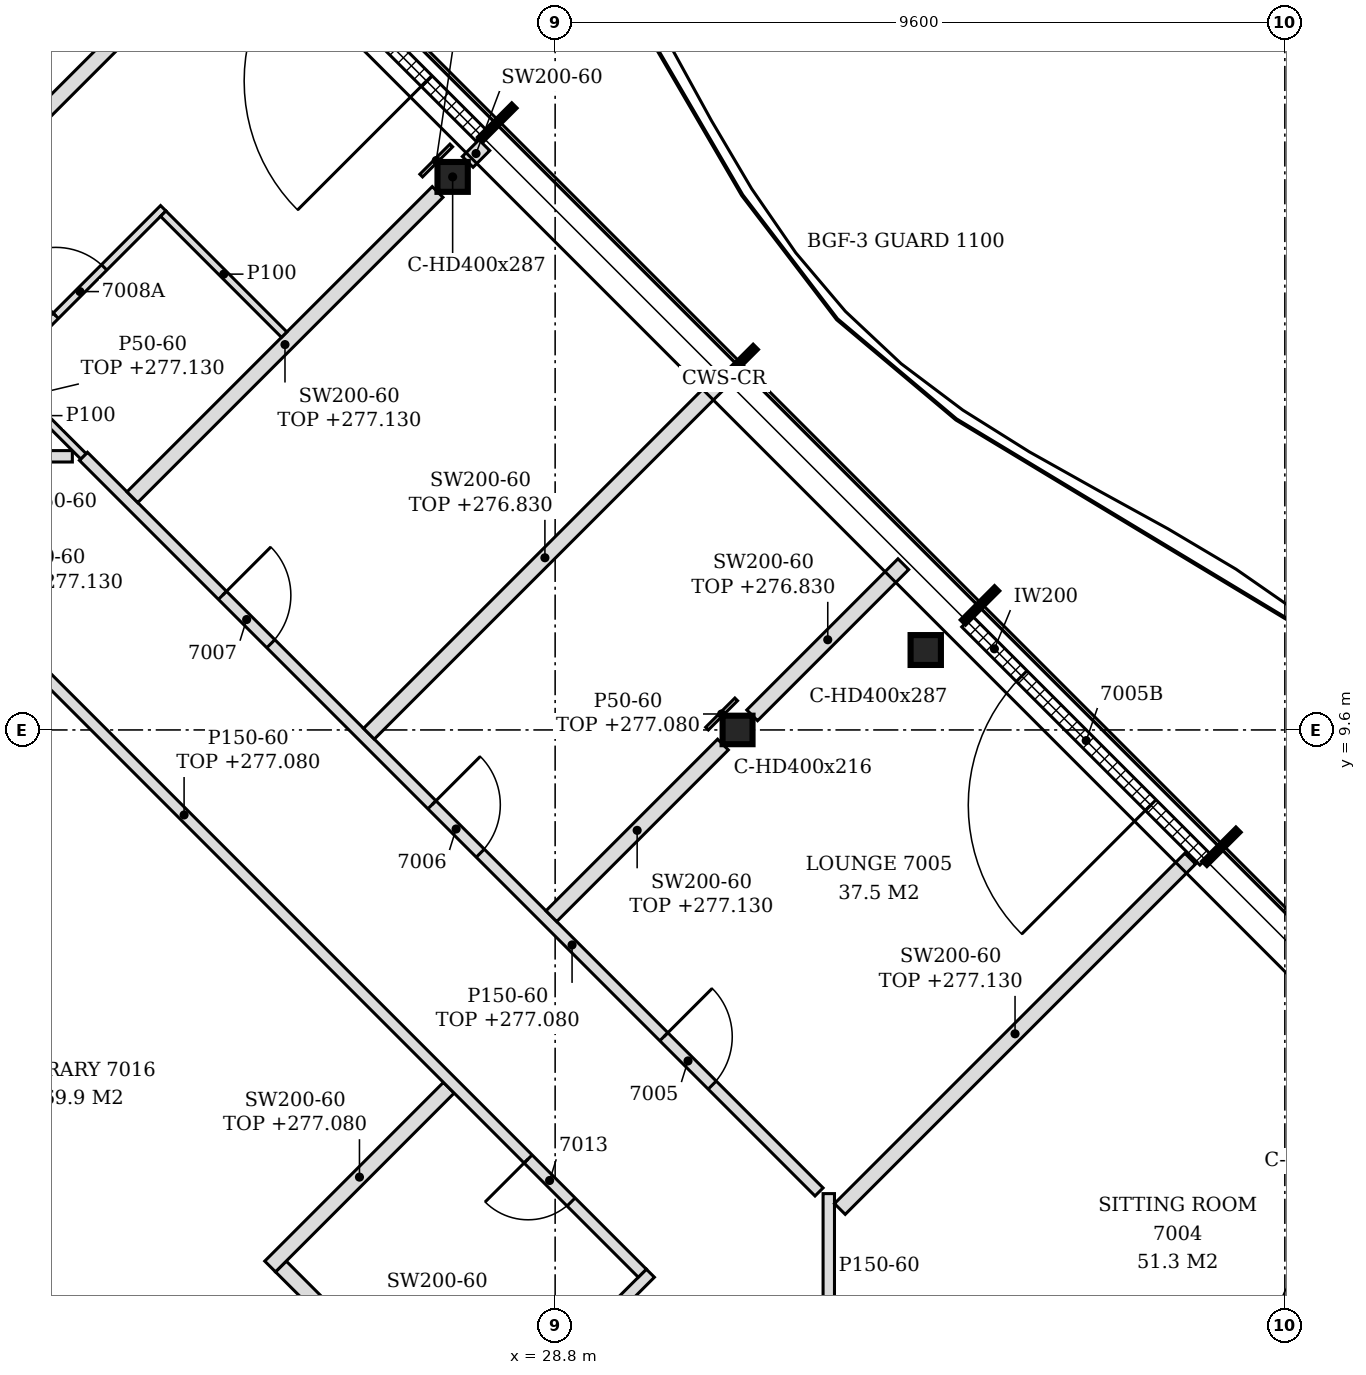
"""IFC4 building model, lengths in metres.
Left out: names, types, materials, properties, quantities, classifications, styles, units other than length and angle.
Written with IfcOpenShell. Run it as: python <this file> out.ifc"""

import sys

from ifc_helpers import new_model, si_unit, direction, frame, frame_2d, origin, origin_2d, place, context, subcontext, project, spatial, rectangle, i_section, extrude, element, fill, save


model = new_model("IFC4")
c1 = context("Model", 3, precision=1e-05, world=origin(), true_north=direction((0.0, 1.0)))
c2 = subcontext(c1, "Body", "Model", "MODEL_VIEW")
j1 = project(units=[si_unit("LENGTHUNIT", "METRE"), si_unit("PLANEANGLEUNIT", "RADIAN")], contexts=[c1])
p1 = place(None, origin())
s1 = spatial("IfcSite", under=j1, at=p1, CompositionType="ELEMENT")
p2 = place(p1, origin())
s2 = spatial("IfcBuilding", under=s1, at=p2, CompositionType="ELEMENT")
p3 = place(p2, frame((0.0, 0.0, 274.2)))
s3 = spatial("IfcBuildingStorey", under=s2, at=p3, CompositionType="ELEMENT", Elevation=274.2)
for number, where, z_axis, x_axis in (
    (1, (33.676, 10.652, -0.15), (0.0, 0.0, 1.0), (1.0, 0.0, 0.0)),
    (2, (27.451, 16.876, -0.15), (0.0, 0.0, 1.0), (1.0, 0.0, 0.0)),
):
    element("IfcColumn", number, at=place(p3, frame(where, z_axis=z_axis, x_axis=x_axis)), inside=s3, PredefinedType="COLUMN", context=c2, shape_type="SweptSolid", body=[
        extrude(i_section(OverallWidth=0.399, OverallDepth=0.393, WebThickness=0.023, FlangeThickness=0.037, FilletRadius=0.015, at=origin_2d()), origin(), (0.0, 0.0, 1.0), 3.6),
    ])
p4 = place(p3, frame((31.2, 9.6, -0.15), z_axis=(0.0, 0.0, 1.0), x_axis=(1.0, 0.0, 0.0)))
e3 = element("IfcColumn", 3, at=p4, inside=s3, PredefinedType="COLUMN", context=c2, shape_type="SweptSolid", body=[
    extrude(i_section(OverallWidth=0.394, OverallDepth=0.375, WebThickness=0.017, FlangeThickness=0.028, FilletRadius=0.015, at=origin_2d()), origin(), (0.0, 0.0, 1.0), 3.6),
])
p5 = place(p3, frame((37.353, 7.893, 0.0), z_axis=(0.0, 0.0, 1.0), x_axis=(-0.707134329907, 0.707079231393, 0.0)))
e4 = element("IfcWall", 4, at=p5, inside=s3, PredefinedType="NOTDEFINED", context=c2, shape_type="SweptSolid", body=[
    extrude(rectangle(XDim=4.431, YDim=0.2, at=frame_2d((2.215, 0.0))), origin(), (0.0, 0.0, 1.0), 3.45),
])
p6 = place(p5, frame((1.015, 0.0, 0.0)))
e5 = element("IfcOpeningElement", 5, at=p6, cuts=e4, PredefinedType="OPENING", context=c2, shape_type="SweptSolid", body=[
    extrude(rectangle(XDim=2.4, YDim=2.4, at=frame_2d((1.2, 1.2))), frame((0.0, 0.11, 0.0), z_axis=(0.0, -1.0, 0.0), x_axis=(1.0, 0.0, 0.0)), (0.0, 0.0, 1.0), 0.22),
])
p7 = place(p3, frame((27.826, 17.42, 0.0), z_axis=(0.0, 0.0, 1.0), x_axis=(-0.707079231393, 0.707134329907, 0.0)))
e6 = element("IfcWall", 6, at=p7, inside=s3, PredefinedType="NOTDEFINED", context=c2, shape_type="SweptSolid", body=[
    extrude(rectangle(XDim=4.431, YDim=0.2, at=frame_2d((2.215, 0.0))), origin(), (0.0, 0.0, 1.0), 3.45),
])
p8 = place(p7, frame((1.015, 0.0, 0.0)))
e7 = element("IfcOpeningElement", 7, at=p8, cuts=e6, PredefinedType="OPENING", context=c2, shape_type="SweptSolid", body=[
    extrude(rectangle(XDim=2.4, YDim=2.4, at=frame_2d((1.2, 1.2))), frame((0.0, 0.11, 0.0), z_axis=(0.0, -1.0, 0.0), x_axis=(1.0, 0.0, 0.0)), (0.0, 0.0, 1.0), 0.22),
])
p9 = place(p3, frame((26.528, -1.072, 0.0), z_axis=(0.0, 0.0, 1.0), x_axis=(0.707106781187, 0.707106781187, 0.0)))
e8 = element("IfcWall", 8, at=p9, inside=s3, PredefinedType="PARTITIONING", context=c2, shape_type="SweptSolid", body=[
    extrude(rectangle(XDim=4.985, YDim=0.15, at=frame_2d((2.492, 0.0))), origin(), (0.0, 0.0, 1.0), 2.88),
])
p10 = place(p3, frame((27.613, 0.119, 0.0), z_axis=(0.0, 0.0, 1.0), x_axis=(-0.706999846325, 0.707213699878, 0.0)))
e9 = element("IfcWall", 9, at=p10, inside=s3, PredefinedType="PARTITIONING", context=c2, shape_type="SweptSolid", body=[
    extrude(rectangle(XDim=3.425, YDim=0.2, at=frame_2d((1.712, 0.0))), origin(), (0.0, 0.0, 1.0), 2.88),
])
p11 = place(p3, frame((32.4, 1.587, 0.0), z_axis=(0.0, 0.0, 1.0), x_axis=(0.0, 1.0, 0.0)))
e10 = element("IfcWall", 10, at=p11, inside=s3, PredefinedType="PARTITIONING", context=c2, shape_type="SweptSolid", body=[
    extrude(rectangle(XDim=1.913, YDim=0.15, at=frame_2d((0.957, 0.0))), origin(), (0.0, 0.0, 1.0), 3.45),
])
p12 = place(p3, frame((25.05, 2.541, 0.0), z_axis=(0.0, 0.0, 1.0), x_axis=(0.706959910949, 0.707253620925, 0.0)))
e11 = element("IfcWall", 11, at=p12, inside=s3, PredefinedType="PARTITIONING", context=c2, shape_type="SweptSolid", body=[
    extrude(rectangle(XDim=3.325, YDim=0.2, at=frame_2d((1.663, 0.0))), origin(), (0.0, 0.0, 1.0), 2.88),
])
p13 = place(p3, frame((29.947, 2.453, 0.0), z_axis=(0.0, 0.0, 1.0), x_axis=(-0.707098603185, 0.707114959093, 0.0)))
e12 = element("IfcWall", 12, at=p13, inside=s3, PredefinedType="PARTITIONING", context=c2, shape_type="SweptSolid", body=[
    extrude(rectangle(XDim=14.927, YDim=0.15, at=frame_2d((7.463, 0.0))), origin(), (0.0, 0.0, 1.0), 2.88),
])
p14 = place(p13, frame((1.325, 0.0, 0.0)))
e13 = element("IfcOpeningElement", 13, at=p14, cuts=e12, PredefinedType="OPENING", context=c2, shape_type="SweptSolid", body=[
    extrude(rectangle(XDim=0.8, YDim=2.1, at=frame_2d((0.4, 1.05))), frame((0.0, 0.085, 0.0), z_axis=(0.0, -1.0, 0.0), x_axis=(1.0, 0.0, 0.0)), (0.0, 0.0, 1.0), 0.17),
])
p15 = place(p3, frame((32.546, 3.298, 0.0), z_axis=(0.0, 0.0, 1.0), x_axis=(0.707106781187, 0.707106781187, 0.0)))
e14 = element("IfcWall", 14, at=p15, inside=s3, PredefinedType="PARTITIONING", context=c2, shape_type="SweptSolid", body=[
    extrude(rectangle(XDim=6.519, YDim=0.2, at=frame_2d((3.26, 0.0))), origin(), (0.0, 0.0, 1.0), 2.93),
])
p16 = place(p3, frame((32.272, 3.522, 0.0), z_axis=(0.0, 0.0, 1.0), x_axis=(-0.707106781187, 0.707106781187, 0.0)))
e15 = element("IfcWall", 15, at=p16, inside=s3, PredefinedType="PARTITIONING", context=c2, shape_type="SweptSolid", body=[
    extrude(rectangle(XDim=13.687, YDim=0.15, at=frame_2d((6.843, 0.0))), origin(), (0.0, 0.0, 1.0), 2.88),
])
p17 = place(p16, frame((1.988, 0.0, 0.0)))
e16 = element("IfcOpeningElement", 16, at=p17, cuts=e15, PredefinedType="OPENING", context=c2, shape_type="SweptSolid", body=[
    extrude(rectangle(XDim=0.9, YDim=2.1, at=frame_2d((0.45, 1.05))), frame((0.0, 0.085, 0.0), z_axis=(0.0, -1.0, 0.0), x_axis=(1.0, 0.0, 0.0)), (0.0, 0.0, 1.0), 0.17),
])
p18 = place(p16, frame((6.303, 0.0, 0.0)))
e17 = element("IfcOpeningElement", 17, at=p18, cuts=e15, PredefinedType="OPENING", context=c2, shape_type="SweptSolid", body=[
    extrude(rectangle(XDim=0.9, YDim=2.1, at=frame_2d((0.45, 1.05))), frame((0.0, 0.085, 0.0), z_axis=(0.0, -1.0, 0.0), x_axis=(1.0, 0.0, 0.0)), (0.0, 0.0, 1.0), 0.17),
])
p19 = place(p16, frame((10.2, 0.0, 0.0)))
e18 = element("IfcOpeningElement", 18, at=p19, cuts=e15, PredefinedType="OPENING", context=c2, shape_type="SweptSolid", body=[
    extrude(rectangle(XDim=0.9, YDim=2.1, at=frame_2d((0.45, 1.05))), frame((0.0, 0.085, 0.0), z_axis=(0.0, -1.0, 0.0), x_axis=(1.0, 0.0, 0.0)), (0.0, 0.0, 1.0), 0.17),
])
p20 = place(p3, frame((28.75, 7.15, 0.0), z_axis=(0.0, 0.0, 1.0), x_axis=(0.707106781187, 0.707106781187, 0.0)))
e19 = element("IfcWall", 19, at=p20, inside=s3, PredefinedType="PARTITIONING", context=c2, shape_type="SweptSolid", body=[
    extrude(rectangle(XDim=3.193, YDim=0.2, at=frame_2d((1.597, 0.0))), origin(), (0.0, 0.0, 1.0), 2.93),
])
p21 = place(p3, frame((26.35, 9.55, 0.0), z_axis=(0.0, 0.0, 1.0), x_axis=(0.707088140984, 0.707125420898, 0.0)))
e20 = element("IfcWall", 20, at=p21, inside=s3, PredefinedType="PARTITIONING", context=c2, shape_type="SweptSolid", body=[
    extrude(rectangle(XDim=6.549, YDim=0.2, at=frame_2d((3.274, 0.0))), origin(), (0.0, 0.0, 1.0), 2.63),
])
p22 = place(p3, frame((31.392, 9.792, 0.0), z_axis=(0.0, 0.0, 1.0), x_axis=(0.707106781187, 0.707106781187, 0.0)))
e21 = element("IfcWall", 21, at=p22, inside=s3, PredefinedType="PARTITIONING", context=c2, shape_type="SweptSolid", body=[
    extrude(rectangle(XDim=2.812, YDim=0.2, at=frame_2d((1.406, 0.0))), origin(), (0.0, 0.0, 1.0), 2.63),
])
p23 = place(p3, frame((23.238, 12.662, 0.0), z_axis=(0.0, 0.0, 1.0), x_axis=(0.707128276734, 0.707085284986, 0.0)))
e22 = element("IfcWall", 22, at=p23, inside=s3, PredefinedType="PARTITIONING", context=c2, shape_type="SweptSolid", body=[
    extrude(rectangle(XDim=5.679, YDim=0.2, at=frame_2d((2.839, 0.0))), origin(), (0.0, 0.0, 1.0), 2.93),
])
p24 = place(p3, frame((19.397, 13.2, 0.0), z_axis=(0.0, 0.0, 1.0), x_axis=(1.0, 0.0, 0.0)))
e23 = element("IfcWall", 23, at=p24, inside=s3, PredefinedType="PARTITIONING", context=c2, shape_type="SweptSolid", body=[
    extrude(rectangle(XDim=3.051, YDim=0.15, at=frame_2d((1.526, 0.0))), origin(), (0.0, 0.0, 1.0), 3.45),
])
p25 = place(p24, frame((1.05, 0.0, 0.0)))
e24 = element("IfcOpeningElement", 24, at=p25, cuts=e23, PredefinedType="OPENING", context=c2, shape_type="SweptSolid", body=[
    extrude(rectangle(XDim=0.9, YDim=2.1, at=frame_2d((0.45, 1.05))), frame((0.0, 0.085, 0.0), z_axis=(0.0, -1.0, 0.0), x_axis=(1.0, 0.0, 0.0)), (0.0, 0.0, 1.0), 0.17),
])
p26 = place(p3, frame((22.594, 13.2, 0.0), z_axis=(0.0, 0.0, 1.0), x_axis=(-0.707106781187, 0.707106781187, 0.0)))
e25 = element("IfcWall", 25, at=p26, inside=s3, PredefinedType="PARTITIONING", context=c2, shape_type="SweptSolid", body=[
    extrude(rectangle(XDim=1.514, YDim=0.1, at=frame_2d((0.757, 0.0))), origin(), (0.0, 0.0, 1.0), 3.45),
])
p27 = place(p3, frame((21.453, 14.271, 0.0), z_axis=(0.0, 0.0, 1.0), x_axis=(0.70690988682, 0.707303620743, 0.0)))
e26 = element("IfcWall", 26, at=p27, inside=s3, PredefinedType="PARTITIONING", context=c2, shape_type="SweptSolid", body=[
    extrude(rectangle(XDim=3.1, YDim=0.1, at=frame_2d((1.55, 0.0))), origin(), (0.0, 0.0, 1.0), 2.93),
])
p28 = place(p27, frame((1.1, 0.0, 0.0)))
e27 = element("IfcOpeningElement", 27, at=p28, cuts=e26, PredefinedType="OPENING", context=c2, shape_type="SweptSolid", body=[
    extrude(rectangle(XDim=0.9, YDim=2.1, at=frame_2d((0.45, 1.05))), frame((0.0, 0.06, 0.0), z_axis=(0.0, -1.0, 0.0), x_axis=(1.0, 0.0, 0.0)), (0.0, 0.0, 1.0), 0.12),
])
p29 = place(p3, frame((18.753, 14.402, 0.0), z_axis=(0.0, 0.0, 1.0), x_axis=(0.707179267043, 0.707034287899, 0.0)))
e28 = element("IfcWall", 28, at=p29, inside=s3, PredefinedType="PARTITIONING", context=c2, shape_type="SweptSolid", body=[
    extrude(rectangle(XDim=8.42, YDim=0.2, at=frame_2d((4.21, 0.0))), origin(), (0.0, 0.0, 1.0), 2.93),
])
p30 = place(p3, frame((25.235, 14.801, 0.0), z_axis=(0.0, 0.0, 1.0), x_axis=(-0.706944047094, 0.707269477836, 0.0)))
e29 = element("IfcWall", 29, at=p30, inside=s3, PredefinedType="PARTITIONING", context=c2, shape_type="SweptSolid", body=[
    extrude(rectangle(XDim=2.251, YDim=0.1, at=frame_2d((1.125, 0.0))), origin(), (0.0, 0.0, 1.0), 3.45),
])
p31 = place(p3, frame((27.65, 17.073, 0.0), z_axis=(0.0, 0.0, 1.0), x_axis=(0.707106781187, 0.707106781187, 0.0)))
e30 = element("IfcWall", 30, at=p31, inside=s3, PredefinedType="PARTITIONING", context=c2, shape_type="SweptSolid", body=[
    extrude(rectangle(XDim=0.31, YDim=0.2, at=frame_2d((0.155, 0.0))), origin(), (0.0, 0.0, 1.0), 3.45),
])
p32 = place(p3, frame((30.798, 9.618, 0.0), z_axis=(0.0, 0.0, 1.0), x_axis=(0.707106781187, 0.707106781187, 0.0)))
e31 = element("IfcWall", 31, at=p32, inside=s3, PredefinedType="PARTITIONING", context=c2, shape_type="SweptSolid", body=[
    extrude(rectangle(XDim=0.544, YDim=0.05, at=frame_2d((0.272, 0.0))), origin(), (0.0, 0.0, 1.0), 2.88),
])
p33 = place(p3, frame((27.038, 16.893, 0.0), z_axis=(0.0, 0.0, 1.0), x_axis=(0.707106781187, 0.707106781187, 0.0)))
e32 = element("IfcWall", 32, at=p33, inside=s3, PredefinedType="PARTITIONING", context=c2, shape_type="SweptSolid", body=[
    extrude(rectangle(XDim=0.56, YDim=0.05, at=frame_2d((0.28, 0.0))), origin(), (0.0, 0.0, 1.0), 2.93),
])
p34 = place(p6, origin())
e33 = element("IfcDoor", 33, at=p34, inside=s3, OperationType="SINGLE_SWING_LEFT", PredefinedType="DOOR", context=c2, shape_type="SweptSolid", body=[
    extrude(rectangle(XDim=2.4, YDim=2.4, at=frame_2d((1.2, 1.2))), frame((0.0, 0.025, 0.0), z_axis=(0.0, -1.0, 0.0), x_axis=(1.0, 0.0, 0.0)), (0.0, 0.0, 1.0), 0.05),
])
fill(e5, e33)
p35 = place(p8, origin())
e34 = element("IfcDoor", 34, at=p35, inside=s3, OperationType="SINGLE_SWING_LEFT", PredefinedType="DOOR", context=c2, shape_type="SweptSolid", body=[
    extrude(rectangle(XDim=2.4, YDim=2.4, at=frame_2d((1.2, 1.2))), frame((0.0, 0.025, 0.0), z_axis=(0.0, -1.0, 0.0), x_axis=(1.0, 0.0, 0.0)), (0.0, 0.0, 1.0), 0.05),
])
fill(e7, e34)
p36 = place(p17, frame((0.9, 0.0, 0.0), z_axis=(0.0, 0.0, 1.0), x_axis=(-1.0, 0.0, 0.0)))
e35 = element("IfcDoor", 35, at=p36, inside=s3, OperationType="SINGLE_SWING_LEFT", PredefinedType="DOOR", context=c2, shape_type="SweptSolid", body=[
    extrude(rectangle(XDim=0.9, YDim=2.1, at=frame_2d((0.45, 1.05))), frame((0.0, 0.025, 0.0), z_axis=(0.0, -1.0, 0.0), x_axis=(1.0, 0.0, 0.0)), (0.0, 0.0, 1.0), 0.05),
])
fill(e16, e35)
p37 = place(p18, frame((0.9, 0.0, 0.0), z_axis=(0.0, 0.0, 1.0), x_axis=(-1.0, 0.0, 0.0)))
e36 = element("IfcDoor", 36, at=p37, inside=s3, OperationType="SINGLE_SWING_LEFT", PredefinedType="DOOR", context=c2, shape_type="SweptSolid", body=[
    extrude(rectangle(XDim=0.9, YDim=2.1, at=frame_2d((0.45, 1.05))), frame((0.0, 0.025, 0.0), z_axis=(0.0, -1.0, 0.0), x_axis=(1.0, 0.0, 0.0)), (0.0, 0.0, 1.0), 0.05),
])
fill(e17, e36)
p38 = place(p19, frame((0.9, 0.0, 0.0), z_axis=(0.0, 0.0, 1.0), x_axis=(-1.0, 0.0, 0.0)))
e37 = element("IfcDoor", 37, at=p38, inside=s3, OperationType="SINGLE_SWING_LEFT", PredefinedType="DOOR", context=c2, shape_type="SweptSolid", body=[
    extrude(rectangle(XDim=0.9, YDim=2.1, at=frame_2d((0.45, 1.05))), frame((0.0, 0.025, 0.0), z_axis=(0.0, -1.0, 0.0), x_axis=(1.0, 0.0, 0.0)), (0.0, 0.0, 1.0), 0.05),
])
fill(e18, e37)
p39 = place(p28, origin())
e38 = element("IfcDoor", 38, at=p39, inside=s3, OperationType="SINGLE_SWING_LEFT", PredefinedType="DOOR", context=c2, shape_type="SweptSolid", body=[
    extrude(rectangle(XDim=0.9, YDim=2.1, at=frame_2d((0.45, 1.05))), frame((0.0, 0.025, 0.0), z_axis=(0.0, -1.0, 0.0), x_axis=(1.0, 0.0, 0.0)), (0.0, 0.0, 1.0), 0.05),
])
fill(e27, e38)
p40 = place(p14, origin())
e39 = element("IfcDoor", 39, at=p40, inside=s3, OperationType="SINGLE_SWING_RIGHT", PredefinedType="DOOR", context=c2, shape_type="SweptSolid", body=[
    extrude(rectangle(XDim=0.8, YDim=2.1, at=frame_2d((0.4, 1.05))), frame((0.0, 0.025, 0.0), z_axis=(0.0, -1.0, 0.0), x_axis=(1.0, 0.0, 0.0)), (0.0, 0.0, 1.0), 0.05),
])
fill(e13, e39)
save(model, sys.argv[1])
